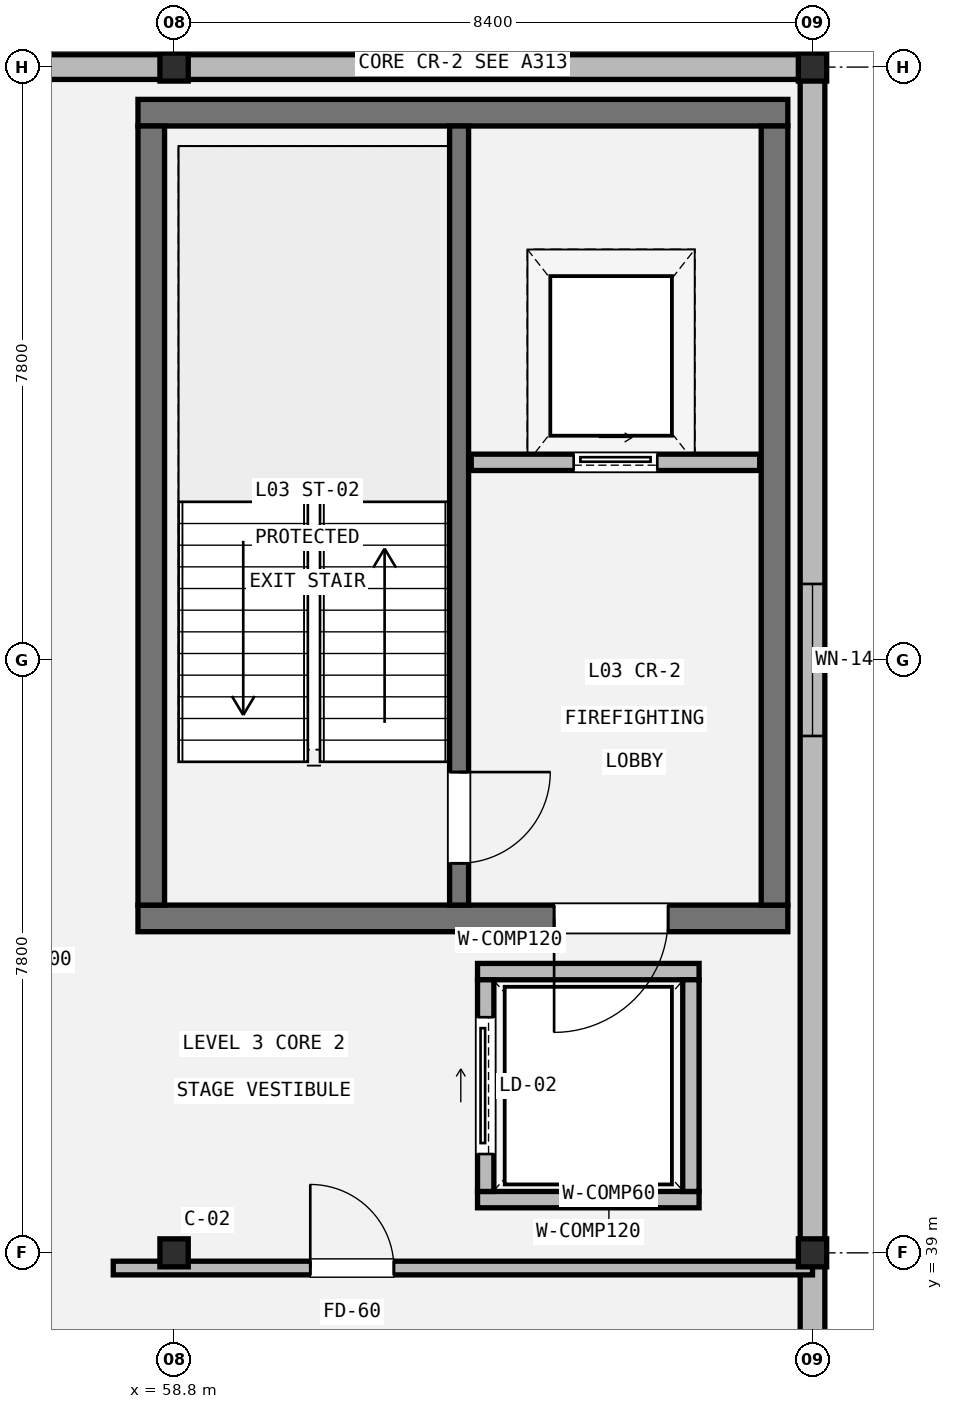
"""IFC4 building model, lengths in metres.
Left out: names, types, materials, properties, quantities, classifications, styles, units other than length and angle.
Written with IfcOpenShell. Run it as: python <this file> out.ifc"""

import sys

from ifc_helpers import new_model, si_unit, direction, frame, frame_2d, origin, origin_2d, place, context, subcontext, project, spatial, rectangle, i_section, extrude, element, fill, save


model = new_model("IFC4")
c1 = context("Model", 3, precision=1e-05, world=origin(), true_north=direction((0.0, 1.0)))
c2 = subcontext(c1, "Body", "Model", "MODEL_VIEW")
j1 = project(units=[si_unit("LENGTHUNIT", "METRE"), si_unit("PLANEANGLEUNIT", "RADIAN")], contexts=[c1])
p1 = place(None, origin())
s1 = spatial("IfcSite", under=j1, at=p1, CompositionType="ELEMENT")
p2 = place(p1, origin())
s2 = spatial("IfcBuilding", under=s1, at=p2, CompositionType="ELEMENT")
p3 = place(p2, frame((0.0, 0.0, 15.0)))
s3 = spatial("IfcBuildingStorey", under=s2, at=p3, CompositionType="ELEMENT", Elevation=15.0)
for number, where, z_axis, x_axis in (
    (1, (58.8, 39.0, 0.0), (0.0, 0.0, 1.0), (1.0, 0.0, 0.0)),
    (2, (58.8, 54.6, 0.0), (0.0, 0.0, 1.0), (1.0, 0.0, 0.0)),
    (3, (67.2, 39.0, 0.0), (0.0, 0.0, 1.0), (1.0, 0.0, 0.0)),
    (4, (67.2, 54.6, 0.0), (0.0, 0.0, 1.0), (1.0, 0.0, 0.0)),
):
    element("IfcColumn", number, at=place(p3, frame(where, z_axis=z_axis, x_axis=x_axis)), inside=s3, PredefinedType="COLUMN", context=c2, shape_type="SweptSolid", body=[
        extrude(i_section(OverallWidth=0.373, OverallDepth=0.368, WebThickness=0.014, FlangeThickness=0.024, FilletRadius=0.015, at=origin_2d()), origin(), (0.0, 0.0, 1.0), 4.2),
    ])
p4 = place(p3, frame((50.4, 54.6, 0.0), z_axis=(0.0, 0.0, 1.0), x_axis=(1.0, 0.0, 0.0)))
e5 = element("IfcWall", 5, at=p4, inside=s3, PredefinedType="STANDARD", context=c2, shape_type="SweptSolid", body=[
    extrude(rectangle(XDim=8.4, YDim=0.325, at=frame_2d((4.2, 0.0))), origin(), (0.0, 0.0, 1.0), 3.453),
])
p5 = place(p3, frame((58.8, 54.6, 0.0), z_axis=(0.0, 0.0, 1.0), x_axis=(1.0, 0.0, 0.0)))
e6 = element("IfcWall", 6, at=p5, inside=s3, PredefinedType="STANDARD", context=c2, shape_type="SweptSolid", body=[
    extrude(rectangle(XDim=8.4, YDim=0.325, at=frame_2d((4.2, 0.0))), origin(), (0.0, 0.0, 1.0), 3.222),
])
p6 = place(p3, frame((67.2, 54.6, 0.0), z_axis=(0.0, 0.0, 1.0), x_axis=(0.0, -1.0, 0.0)))
e7 = element("IfcWall", 7, at=p6, inside=s3, PredefinedType="STANDARD", context=c2, shape_type="SweptSolid", body=[
    extrude(rectangle(XDim=15.6, YDim=0.325, at=frame_2d((7.8, 0.0))), origin(), (0.0, 0.0, 1.0), 3.222),
])
p7 = place(p6, frame((6.8, 0.0, 0.9)))
e8 = element("IfcOpeningElement", 8, at=p7, cuts=e7, PredefinedType="OPENING", context=c2, shape_type="SweptSolid", body=[
    extrude(rectangle(XDim=2.0, YDim=1.1, at=frame_2d((1.0, 0.55))), frame((0.0, 0.172, 0.0), z_axis=(0.0, -1.0, 0.0), x_axis=(1.0, 0.0, 0.0)), (0.0, 0.0, 1.0), 0.345),
])
p8 = place(p3, frame((67.2, 39.0, 0.0), z_axis=(0.0, 0.0, 1.0), x_axis=(0.0, -1.0, 0.0)))
e9 = element("IfcWall", 9, at=p8, inside=s3, PredefinedType="STANDARD", context=c2, shape_type="SweptSolid", body=[
    extrude(rectangle(XDim=7.8, YDim=0.325, at=frame_2d((3.9, 0.0))), origin(), (0.0, 0.0, 1.0), 3.222),
])
p9 = place(p8, frame((2.8, 0.0, 0.9)))
e10 = element("IfcOpeningElement", 10, at=p9, cuts=e9, PredefinedType="OPENING", context=c2, shape_type="SweptSolid", body=[
    extrude(rectangle(XDim=2.2, YDim=1.15, at=frame_2d((1.1, 0.575))), frame((0.0, 0.172, 0.0), z_axis=(0.0, -1.0, 0.0), x_axis=(1.0, 0.0, 0.0)), (0.0, 0.0, 1.0), 0.345),
])
p10 = place(p3, frame((66.875, 43.4, 0.0), z_axis=(0.0, 0.0, 1.0), x_axis=(-1.0, 0.0, 0.0)))
e11 = element("IfcWall", 11, at=p10, inside=s3, PredefinedType="SHEAR", context=c2, shape_type="SweptSolid", body=[
    extrude(rectangle(XDim=8.55, YDim=0.35, at=frame_2d((4.275, 0.0))), origin(), (0.0, 0.0, 1.0), 4.0),
])
p11 = place(p10, frame((1.575, 0.0, 0.0)))
e12 = element("IfcOpeningElement", 12, at=p11, cuts=e11, PredefinedType="OPENING", context=c2, shape_type="SweptSolid", body=[
    extrude(rectangle(XDim=1.5, YDim=2.15, at=frame_2d((0.75, 1.075))), frame((0.0, 0.185, 0.0), z_axis=(0.0, -1.0, 0.0), x_axis=(1.0, 0.0, 0.0)), (0.0, 0.0, 1.0), 0.37),
])
p12 = place(p3, frame((58.325, 54.0, 0.0), z_axis=(0.0, 0.0, 1.0), x_axis=(1.0, 0.0, 0.0)))
e13 = element("IfcWall", 13, at=p12, inside=s3, PredefinedType="SHEAR", context=c2, shape_type="SweptSolid", body=[
    extrude(rectangle(XDim=8.55, YDim=0.35, at=frame_2d((4.275, 0.0))), origin(), (0.0, 0.0, 1.0), 4.0),
])
for number, where, z_axis, x_axis in (
    (14, (58.5, 43.575, 0.0), (0.0, 0.0, 1.0), (0.0, 1.0, 0.0)),
    (15, (66.7, 53.825, 0.0), (0.0, 0.0, 1.0), (0.0, -1.0, 0.0)),
):
    element("IfcWall", number, at=place(p3, frame(where, z_axis=z_axis, x_axis=x_axis)), inside=s3, PredefinedType="SHEAR", context=c2, shape_type="SweptSolid", body=[
        extrude(rectangle(XDim=10.25, YDim=0.35, at=frame_2d((5.125, 0.0))), origin(), (0.0, 0.0, 1.0), 4.0),
    ])
p13 = place(p3, frame((62.55, 53.825, 0.0), z_axis=(0.0, 0.0, 1.0), x_axis=(0.0, -1.0, 0.0)))
e16 = element("IfcWall", 16, at=p13, inside=s3, PredefinedType="SHEAR", context=c2, shape_type="SweptSolid", body=[
    extrude(rectangle(XDim=10.25, YDim=0.25, at=frame_2d((5.125, 0.0))), origin(), (0.0, 0.0, 1.0), 4.0),
])
p14 = place(p13, frame((8.5, 0.0, 0.0)))
e17 = element("IfcOpeningElement", 17, at=p14, cuts=e16, PredefinedType="OPENING", context=c2, shape_type="SweptSolid", body=[
    extrude(rectangle(XDim=1.2, YDim=2.15, at=frame_2d((0.6, 1.075))), frame((0.0, 0.135, 0.0), z_axis=(0.0, -1.0, 0.0), x_axis=(1.0, 0.0, 0.0)), (0.0, 0.0, 1.0), 0.27),
])
p15 = place(p3, frame((62.71, 49.4, 0.0), z_axis=(0.0, 0.0, 1.0), x_axis=(1.0, 0.0, 0.0)))
e18 = element("IfcWall", 18, at=p15, inside=s3, PredefinedType="STANDARD", context=c2, shape_type="SweptSolid", body=[
    extrude(rectangle(XDim=3.795, YDim=0.215, at=frame_2d((1.897, 0.0))), origin(), (0.0, 0.0, 1.0), 3.992),
])
p16 = place(p15, frame((1.347, 0.0, 0.0)))
e19 = element("IfcOpeningElement", 19, at=p16, cuts=e18, PredefinedType="OPENING", context=c2, shape_type="SweptSolid", body=[
    extrude(rectangle(XDim=1.1, YDim=2.2, at=frame_2d((0.55, 1.1))), frame((0.0, 0.117, 0.0), z_axis=(0.0, -1.0, 0.0), x_axis=(1.0, 0.0, 0.0)), (0.0, 0.0, 1.0), 0.235),
])
for number, where, z_axis, x_axis in (
    (20, (65.708, 39.7, 0.0), (0.0, 0.0, 1.0), (-1.0, 0.0, 0.0)),
    (21, (62.792, 42.7, 0.0), (0.0, 0.0, 1.0), (1.0, 0.0, 0.0)),
):
    element("IfcWall", number, at=place(p3, frame(where, z_axis=z_axis, x_axis=x_axis)), inside=s3, PredefinedType="STANDARD", context=c2, shape_type="SweptSolid", body=[
        extrude(rectangle(XDim=2.915, YDim=0.215, at=frame_2d((1.458, 0.0))), origin(), (0.0, 0.0, 1.0), 3.992),
    ])
p17 = place(p3, frame((62.9, 39.808, 0.0), z_axis=(0.0, 0.0, 1.0), x_axis=(0.0, 1.0, 0.0)))
e22 = element("IfcWall", 22, at=p17, inside=s3, PredefinedType="STANDARD", context=c2, shape_type="SweptSolid", body=[
    extrude(rectangle(XDim=2.785, YDim=0.215, at=frame_2d((1.393, 0.0))), origin(), (0.0, 0.0, 1.0), 3.992),
])
p18 = place(p17, frame((0.492, 0.0, 0.0)))
e23 = element("IfcOpeningElement", 23, at=p18, cuts=e22, PredefinedType="OPENING", context=c2, shape_type="SweptSolid", body=[
    extrude(rectangle(XDim=1.8, YDim=2.4, at=frame_2d((0.9, 1.2))), frame((0.0, 0.117, 0.0), z_axis=(0.0, -1.0, 0.0), x_axis=(1.0, 0.0, 0.0)), (0.0, 0.0, 1.0), 0.235),
])
p19 = place(p3, frame((65.6, 42.593, 0.0), z_axis=(0.0, 0.0, 1.0), x_axis=(0.0, -1.0, 0.0)))
e24 = element("IfcWall", 24, at=p19, inside=s3, PredefinedType="STANDARD", context=c2, shape_type="SweptSolid", body=[
    extrude(rectangle(XDim=2.785, YDim=0.215, at=frame_2d((1.393, 0.0))), origin(), (0.0, 0.0, 1.0), 3.992),
])
p20 = place(p3, frame((58.0, 38.8, 0.0), z_axis=(0.0, 0.0, 1.0), x_axis=(1.0, 0.0, 0.0)))
e25 = element("IfcWall", 25, at=p20, inside=s3, PredefinedType="STANDARD", context=c2, shape_type="SweptSolid", body=[
    extrude(rectangle(XDim=9.2, YDim=0.18, at=frame_2d((4.6, 0.0))), origin(), (0.0, 0.0, 1.0), 3.222),
])
p21 = place(p20, frame((2.592, 0.0, 0.0)))
e26 = element("IfcOpeningElement", 26, at=p21, cuts=e25, PredefinedType="OPENING", context=c2, shape_type="SweptSolid", body=[
    extrude(rectangle(XDim=1.1, YDim=2.15, at=frame_2d((0.55, 1.075))), frame((0.0, 0.1, 0.0), z_axis=(0.0, -1.0, 0.0), x_axis=(1.0, 0.0, 0.0)), (0.0, 0.0, 1.0), 0.2),
])
p22 = place(p7, origin())
e27 = element("IfcWindow", 27, at=p22, inside=s3, PartitioningType="SINGLE_PANEL", PredefinedType="WINDOW", context=c2, shape_type="SweptSolid", body=[
    extrude(rectangle(XDim=2.0, YDim=1.1, at=frame_2d((1.0, 0.55))), frame((0.0, 0.03, 0.0), z_axis=(0.0, -1.0, 0.0), x_axis=(1.0, 0.0, 0.0)), (0.0, 0.0, 1.0), 0.06),
])
fill(e8, e27)
p23 = place(p14, origin())
e28 = element("IfcDoor", 28, at=p23, inside=s3, OperationType="SINGLE_SWING_LEFT", PredefinedType="DOOR", context=c2, shape_type="SweptSolid", body=[
    extrude(rectangle(XDim=1.2, YDim=2.15, at=frame_2d((0.6, 1.075))), frame((0.0, 0.025, 0.0), z_axis=(0.0, -1.0, 0.0), x_axis=(1.0, 0.0, 0.0)), (0.0, 0.0, 1.0), 0.05),
])
fill(e17, e28)
p24 = place(p11, origin())
e29 = element("IfcDoor", 29, at=p24, inside=s3, OperationType="SINGLE_SWING_RIGHT", PredefinedType="DOOR", context=c2, shape_type="SweptSolid", body=[
    extrude(rectangle(XDim=1.5, YDim=2.15, at=frame_2d((0.75, 1.075))), frame((0.0, 0.025, 0.0), z_axis=(0.0, -1.0, 0.0), x_axis=(1.0, 0.0, 0.0)), (0.0, 0.0, 1.0), 0.05),
])
fill(e12, e29)
p25 = place(p16, origin())
e30 = element("IfcDoor", 30, at=p25, inside=s3, OperationType="SLIDING_TO_RIGHT", PredefinedType="DOOR", context=c2, shape_type="SweptSolid", body=[
    extrude(rectangle(XDim=1.1, YDim=2.2, at=frame_2d((0.55, 1.1))), frame((0.0, 0.025, 0.0), z_axis=(0.0, -1.0, 0.0), x_axis=(1.0, 0.0, 0.0)), (0.0, 0.0, 1.0), 0.05),
])
fill(e19, e30)
p26 = place(p18, origin())
e31 = element("IfcDoor", 31, at=p26, inside=s3, OperationType="SLIDING_TO_RIGHT", PredefinedType="DOOR", context=c2, shape_type="SweptSolid", body=[
    extrude(rectangle(XDim=1.8, YDim=2.4, at=frame_2d((0.9, 1.2))), frame((0.0, 0.025, 0.0), z_axis=(0.0, -1.0, 0.0), x_axis=(1.0, 0.0, 0.0)), (0.0, 0.0, 1.0), 0.05),
])
fill(e23, e31)
p27 = place(p21, origin())
e32 = element("IfcDoor", 32, at=p27, inside=s3, OperationType="SINGLE_SWING_LEFT", PredefinedType="DOOR", context=c2, shape_type="SweptSolid", body=[
    extrude(rectangle(XDim=1.1, YDim=2.15, at=frame_2d((0.55, 1.075))), frame((0.0, 0.025, 0.0), z_axis=(0.0, -1.0, 0.0), x_axis=(1.0, 0.0, 0.0)), (0.0, 0.0, 1.0), 0.05),
])
fill(e26, e32)
save(model, sys.argv[1])
